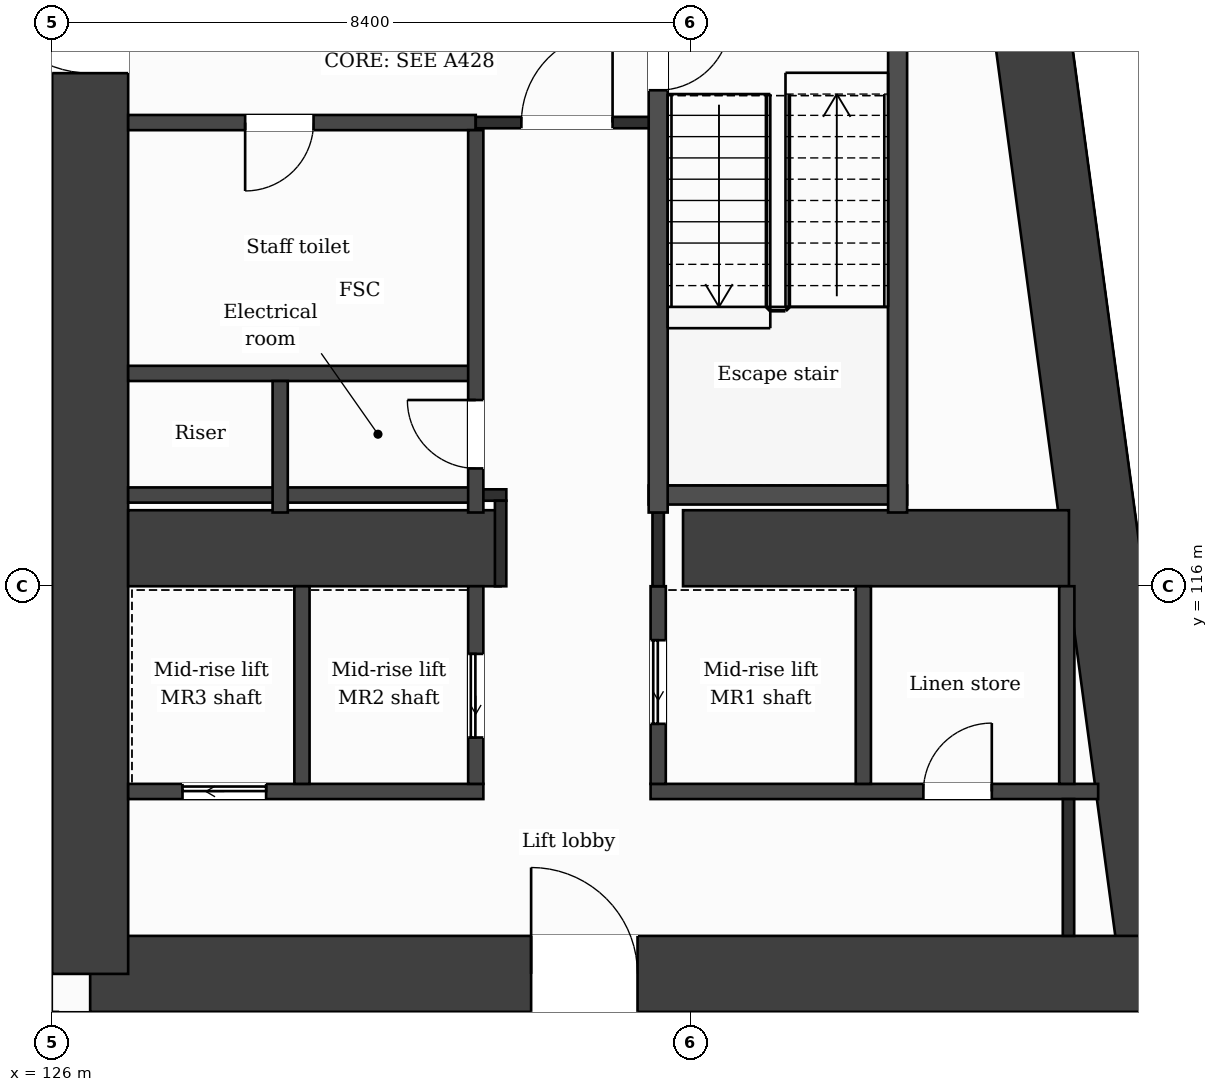
"""IFC4 building model, lengths in metres.
Left out: names, types, materials, properties, quantities, classifications, styles, units other than length and angle.
Written with IfcOpenShell. Run it as: python <this file> out.ifc"""

import sys

from ifc_helpers import new_model, si_unit, direction, frame, frame_2d, origin, place, context, subcontext, project, spatial, rectangle, extrude, element, fill, save


model = new_model("IFC4")
c1 = context("Model", 3, precision=1e-05, world=origin(), true_north=direction((0.0, 1.0)))
c2 = subcontext(c1, "Body", "Model", "MODEL_VIEW")
j1 = project(units=[si_unit("LENGTHUNIT", "METRE"), si_unit("PLANEANGLEUNIT", "RADIAN")], contexts=[c1])
p1 = place(None, origin())
s1 = spatial("IfcSite", under=j1, at=p1, CompositionType="ELEMENT")
p2 = place(p1, origin())
s2 = spatial("IfcBuilding", under=s1, at=p2, CompositionType="ELEMENT")
p3 = place(p2, frame((0.0, 0.0, 116.9)))
s3 = spatial("IfcBuildingStorey", under=s2, at=p3, CompositionType="ELEMENT", Elevation=116.9)
p4 = place(p3, frame((137.732, 131.9, 0.0), z_axis=(0.0, 0.0, 1.0), x_axis=(0.133411141623, -0.991060778808, 0.0)))
e1 = element("IfcWall", 1, at=p4, inside=s3, PredefinedType="SHEAR", context=c2, shape_type="SweptSolid", body=[
    extrude(rectangle(XDim=21.189, YDim=1.0, at=frame_2d((10.595, 0.0))), origin(), (0.0, 0.0, 1.0), 3.7),
])
p5 = place(p3, frame((140.559, 110.9, 0.0), z_axis=(0.0, 0.0, 1.0), x_axis=(-1.0, 0.0, 0.0)))
e2 = element("IfcWall", 2, at=p5, inside=s3, PredefinedType="SHEAR", context=c2, shape_type="SweptSolid", body=[
    extrude(rectangle(XDim=14.059, YDim=1.0, at=frame_2d((7.029, 0.0))), origin(), (0.0, 0.0, 1.0), 3.7),
])
p6 = place(p5, frame((6.858, 0.0, 0.0)))
e3 = element("IfcOpeningElement", 3, at=p6, cuts=e2, PredefinedType="OPENING", context=c2, shape_type="SweptSolid", body=[
    extrude(rectangle(XDim=1.4, YDim=2.1, at=frame_2d((0.7, 1.05))), frame((0.0, 0.51, 0.0), z_axis=(0.0, -1.0, 0.0), x_axis=(1.0, 0.0, 0.0)), (0.0, 0.0, 1.0), 1.02),
])
p7 = place(p3, frame((126.5, 110.9, 0.0), z_axis=(0.0, 0.0, 1.0), x_axis=(0.0, 1.0, 0.0)))
e4 = element("IfcWall", 4, at=p7, inside=s3, PredefinedType="SHEAR", context=c2, shape_type="SweptSolid", body=[
    extrude(rectangle(XDim=21.0, YDim=1.0, at=frame_2d((10.5, 0.0))), origin(), (0.0, 0.0, 1.0), 3.7),
])
p8 = place(p7, frame((11.85, 0.0, 0.0)))
e5 = element("IfcOpeningElement", 5, at=p8, cuts=e4, PredefinedType="OPENING", context=c2, shape_type="SweptSolid", body=[
    extrude(rectangle(XDim=1.4, YDim=2.1, at=frame_2d((0.7, 1.05))), frame((0.0, 0.51, 0.0), z_axis=(0.0, -1.0, 0.0), x_axis=(1.0, 0.0, 0.0)), (0.0, 0.0, 1.0), 1.02),
])
p9 = place(p3, frame((127.0, 116.5, 0.0), z_axis=(0.0, 0.0, 1.0), x_axis=(1.0, 0.0, 0.0)))
e6 = element("IfcWall", 6, at=p9, inside=s3, PredefinedType="SHEAR", context=c2, shape_type="SweptSolid", body=[
    extrude(rectangle(XDim=4.9, YDim=1.0, at=frame_2d((2.45, 0.0))), origin(), (0.0, 0.0, 1.0), 3.7),
])
p10 = place(p3, frame((134.3, 116.5, 0.0), z_axis=(0.0, 0.0, 1.0), x_axis=(1.0, 0.0, 0.0)))
e7 = element("IfcWall", 7, at=p10, inside=s3, PredefinedType="SHEAR", context=c2, shape_type="SweptSolid", body=[
    extrude(rectangle(XDim=5.077, YDim=1.0, at=frame_2d((2.539, 0.0))), origin(), (0.0, 0.0, 1.0), 3.7),
])
p11 = place(p3, frame((140.348, 103.85, 0.0), z_axis=(0.0, 0.0, 1.0), x_axis=(-0.133431549479, 0.991058031401, 0.0)))
e8 = element("IfcWall", 8, at=p11, inside=s3, PredefinedType="SOLIDWALL", context=c2, shape_type="SweptSolid", body=[
    extrude(rectangle(XDim=6.609, YDim=0.3, at=frame_2d((3.304, 0.0))), origin(), (0.0, 0.0, 1.0), 3.38),
])
p12 = place(p11, frame((0.737, 0.0, 0.9)))
e9 = element("IfcOpeningElement", 9, at=p12, cuts=e8, PredefinedType="OPENING", context=c2, shape_type="SweptSolid", body=[
    extrude(rectangle(XDim=1.2, YDim=2.1, at=frame_2d((0.6, 1.05))), frame((0.0, 0.16, 0.0), z_axis=(0.0, -1.0, 0.0), x_axis=(1.0, 0.0, 0.0)), (0.0, 0.0, 1.0), 0.32),
])
p13 = place(p11, frame((3.991, 0.0, 0.0)))
e10 = element("IfcOpeningElement", 10, at=p13, cuts=e8, PredefinedType="OPENING", context=c2, shape_type="SweptSolid", body=[
    extrude(rectangle(XDim=1.2, YDim=2.4, at=frame_2d((0.6, 1.2))), frame((0.0, 0.16, 0.0), z_axis=(0.0, -1.0, 0.0), x_axis=(1.0, 0.0, 0.0)), (0.0, 0.0, 1.0), 0.32),
])
p14 = place(p3, frame((127.0, 113.3, 0.0), z_axis=(0.0, 0.0, 1.0), x_axis=(1.0, 0.0, 0.0)))
e11 = element("IfcWall", 11, at=p14, inside=s3, PredefinedType="PARTITIONING", context=c2, shape_type="SweptSolid", body=[
    extrude(rectangle(XDim=4.673, YDim=0.2, at=frame_2d((2.336, 0.0))), origin(), (0.0, 0.0, 1.0), 3.38),
])
p15 = place(p14, frame((0.715, 0.0, 0.0)))
e12 = element("IfcOpeningElement", 12, at=p15, cuts=e11, PredefinedType="OPENING", context=c2, shape_type="SweptSolid", body=[
    extrude(rectangle(XDim=1.1, YDim=2.1, at=frame_2d((0.55, 1.05))), frame((0.0, 0.11, 0.0), z_axis=(0.0, -1.0, 0.0), x_axis=(1.0, 0.0, 0.0)), (0.0, 0.0, 1.0), 0.22),
])
p16 = place(p3, frame((133.873, 113.3, 0.0), z_axis=(0.0, 0.0, 1.0), x_axis=(1.0, 0.0, 0.0)))
e13 = element("IfcWall", 13, at=p16, inside=s3, PredefinedType="PARTITIONING", context=c2, shape_type="SweptSolid", body=[
    extrude(rectangle(XDim=5.888, YDim=0.2, at=frame_2d((2.944, 0.0))), origin(), (0.0, 0.0, 1.0), 3.38),
])
p17 = place(p16, frame((3.589, 0.0, 0.0)))
e14 = element("IfcOpeningElement", 14, at=p17, cuts=e13, PredefinedType="OPENING", context=c2, shape_type="SweptSolid", body=[
    extrude(rectangle(XDim=0.9, YDim=2.1, at=frame_2d((0.45, 1.05))), frame((0.0, 0.11, 0.0), z_axis=(0.0, -1.0, 0.0), x_axis=(1.0, 0.0, 0.0)), (0.0, 0.0, 1.0), 0.22),
])
p18 = place(p3, frame((127.0, 117.2, 0.0), z_axis=(0.0, 0.0, 1.0), x_axis=(1.0, 0.0, 0.0)))
e15 = element("IfcWall", 15, at=p18, inside=s3, PredefinedType="PARTITIONING", context=c2, shape_type="SweptSolid", body=[
    extrude(rectangle(XDim=4.573, YDim=0.2, at=frame_2d((2.287, 0.0))), origin(), (0.0, 0.0, 1.0), 3.38),
])
p19 = place(p3, frame((131.573, 117.2, 0.0), z_axis=(0.0, 0.0, 1.0), x_axis=(1.0, 0.0, 0.0)))
e16 = element("IfcWall", 16, at=p19, inside=s3, PredefinedType="PARTITIONING", context=c2, shape_type="SweptSolid", body=[
    extrude(rectangle(XDim=0.402, YDim=0.15, at=frame_2d((0.201, 0.0))), origin(), (0.0, 0.0, 1.0), 3.38),
])
p20 = place(p3, frame((133.848, 117.2, 0.0), z_axis=(0.0, 0.0, 1.0), x_axis=(1.0, 0.0, 0.0)))
e17 = element("IfcWall", 17, at=p20, inside=s3, PredefinedType="PARTITIONING", context=c2, shape_type="SweptSolid", body=[
    extrude(rectangle(XDim=3.4, YDim=0.25, at=frame_2d((1.7, 0.0))), origin(), (0.0, 0.0, 1.0), 3.38),
])
p21 = place(p3, frame((127.0, 118.8, 0.0), z_axis=(0.0, 0.0, 1.0), x_axis=(1.0, 0.0, 0.0)))
e18 = element("IfcWall", 18, at=p21, inside=s3, PredefinedType="PARTITIONING", context=c2, shape_type="SweptSolid", body=[
    extrude(rectangle(XDim=4.573, YDim=0.2, at=frame_2d((2.287, 0.0))), origin(), (0.0, 0.0, 1.0), 3.38),
])
p22 = place(p3, frame((127.0, 122.1, 0.0), z_axis=(0.0, 0.0, 1.0), x_axis=(1.0, 0.0, 0.0)))
e19 = element("IfcWall", 19, at=p22, inside=s3, PredefinedType="PARTITIONING", context=c2, shape_type="SweptSolid", body=[
    extrude(rectangle(XDim=4.573, YDim=0.2, at=frame_2d((2.287, 0.0))), origin(), (0.0, 0.0, 1.0), 3.38),
])
p23 = place(p22, frame((1.539, 0.0, 0.0)))
e20 = element("IfcOpeningElement", 20, at=p23, cuts=e19, PredefinedType="OPENING", context=c2, shape_type="SweptSolid", body=[
    extrude(rectangle(XDim=0.9, YDim=2.1, at=frame_2d((0.45, 1.05))), frame((0.0, 0.11, 0.0), z_axis=(0.0, -1.0, 0.0), x_axis=(1.0, 0.0, 0.0)), (0.0, 0.0, 1.0), 0.22),
])
p24 = place(p3, frame((131.573, 122.1, 0.0), z_axis=(0.0, 0.0, 1.0), x_axis=(1.0, 0.0, 0.0)))
e21 = element("IfcWall", 21, at=p24, inside=s3, PredefinedType="PARTITIONING", context=c2, shape_type="SweptSolid", body=[
    extrude(rectangle(XDim=2.4, YDim=0.15, at=frame_2d((1.2, 0.0))), origin(), (0.0, 0.0, 1.0), 3.38),
])
p25 = place(p24, frame((0.6, 0.0, 0.0)))
e22 = element("IfcOpeningElement", 22, at=p25, cuts=e21, PredefinedType="OPENING", context=c2, shape_type="SweptSolid", body=[
    extrude(rectangle(XDim=1.2, YDim=2.1, at=frame_2d((0.6, 1.05))), frame((0.0, 0.085, 0.0), z_axis=(0.0, -1.0, 0.0), x_axis=(1.0, 0.0, 0.0)), (0.0, 0.0, 1.0), 0.17),
])
p26 = place(p3, frame((100.8, 122.45, 0.0), z_axis=(0.0, 0.0, 1.0), x_axis=(1.0, 0.0, 0.0)))
e23 = element("IfcWall", 23, at=p26, inside=s3, PredefinedType="PARTITIONING", context=c2, shape_type="SweptSolid", body=[
    extrude(rectangle(XDim=25.2, YDim=0.15, at=frame_2d((12.6, 0.0))), origin(), (0.0, 0.0, 1.0), 3.38),
])
p27 = place(p3, frame((126.0, 109.075, 0.0), z_axis=(0.0, 0.0, 1.0), x_axis=(0.0, 1.0, 0.0)))
e24 = element("IfcWall", 24, at=p27, inside=s3, PredefinedType="PARTITIONING", context=c2, shape_type="SweptSolid", body=[
    extrude(rectangle(XDim=1.325, YDim=0.15, at=frame_2d((0.663, 0.0))), origin(), (0.0, 0.0, 1.0), 3.38),
])
p28 = place(p3, frame((129.0, 116.97, 0.0), z_axis=(0.0, 0.0, 1.0), x_axis=(0.0, 1.0, 0.0)))
e25 = element("IfcWall", 25, at=p28, inside=s3, PredefinedType="PARTITIONING", context=c2, shape_type="SweptSolid", body=[
    extrude(rectangle(XDim=1.73, YDim=0.2, at=frame_2d((0.865, 0.0))), origin(), (0.0, 0.0, 1.0), 3.38),
])
p29 = place(p3, frame((129.287, 113.4, 0.0), z_axis=(0.0, 0.0, 1.0), x_axis=(0.0, 1.0, 0.0)))
e26 = element("IfcWall", 26, at=p29, inside=s3, PredefinedType="PARTITIONING", context=c2, shape_type="SweptSolid", body=[
    extrude(rectangle(XDim=2.6, YDim=0.2, at=frame_2d((1.3, 0.0))), origin(), (0.0, 0.0, 1.0), 3.38),
])
p30 = place(p3, frame((131.573, 113.4, 0.0), z_axis=(0.0, 0.0, 1.0), x_axis=(0.0, 1.0, 0.0)))
e27 = element("IfcWall", 27, at=p30, inside=s3, PredefinedType="PARTITIONING", context=c2, shape_type="SweptSolid", body=[
    extrude(rectangle(XDim=2.6, YDim=0.2, at=frame_2d((1.3, 0.0))), origin(), (0.0, 0.0, 1.0), 3.38),
])
p31 = place(p30, frame((0.61, 0.0, 0.0)))
e28 = element("IfcOpeningElement", 28, at=p31, cuts=e27, PredefinedType="OPENING", context=c2, shape_type="SweptSolid", body=[
    extrude(rectangle(XDim=1.1, YDim=2.1, at=frame_2d((0.55, 1.05))), frame((0.0, 0.11, 0.0), z_axis=(0.0, -1.0, 0.0), x_axis=(1.0, 0.0, 0.0)), (0.0, 0.0, 1.0), 0.22),
])
p32 = place(p3, frame((131.573, 116.97, 0.0), z_axis=(0.0, 0.0, 1.0), x_axis=(0.0, 1.0, 0.0)))
e29 = element("IfcWall", 29, at=p32, inside=s3, PredefinedType="PARTITIONING", context=c2, shape_type="SweptSolid", body=[
    extrude(rectangle(XDim=5.03, YDim=0.2, at=frame_2d((2.515, 0.0))), origin(), (0.0, 0.0, 1.0), 3.38),
])
p33 = place(p32, frame((0.58, 0.0, 0.0)))
e30 = element("IfcOpeningElement", 30, at=p33, cuts=e29, PredefinedType="OPENING", context=c2, shape_type="SweptSolid", body=[
    extrude(rectangle(XDim=0.9, YDim=2.1, at=frame_2d((0.45, 1.05))), frame((0.0, 0.11, 0.0), z_axis=(0.0, -1.0, 0.0), x_axis=(1.0, 0.0, 0.0)), (0.0, 0.0, 1.0), 0.22),
])
p34 = place(p3, frame((131.9, 116.0, 0.0), z_axis=(0.0, 0.0, 1.0), x_axis=(0.0, 1.0, 0.0)))
e31 = element("IfcWall", 31, at=p34, inside=s3, PredefinedType="PARTITIONING", context=c2, shape_type="SweptSolid", body=[
    extrude(rectangle(XDim=1.125, YDim=0.15, at=frame_2d((0.562, 0.0))), origin(), (0.0, 0.0, 1.0), 3.38),
])
p35 = place(p3, frame((133.973, 113.4, 0.0), z_axis=(0.0, 0.0, 1.0), x_axis=(0.0, 1.0, 0.0)))
e32 = element("IfcWall", 32, at=p35, inside=s3, PredefinedType="PARTITIONING", context=c2, shape_type="SweptSolid", body=[
    extrude(rectangle(XDim=2.6, YDim=0.2, at=frame_2d((1.3, 0.0))), origin(), (0.0, 0.0, 1.0), 3.38),
])
p36 = place(p35, frame((0.79, 0.0, 0.0)))
e33 = element("IfcOpeningElement", 33, at=p36, cuts=e32, PredefinedType="OPENING", context=c2, shape_type="SweptSolid", body=[
    extrude(rectangle(XDim=1.1, YDim=2.1, at=frame_2d((0.55, 1.05))), frame((0.0, 0.11, 0.0), z_axis=(0.0, -1.0, 0.0), x_axis=(1.0, 0.0, 0.0)), (0.0, 0.0, 1.0), 0.22),
])
p37 = place(p3, frame((133.973, 116.0, 0.0), z_axis=(0.0, 0.0, 1.0), x_axis=(0.0, 1.0, 0.0)))
e34 = element("IfcWall", 34, at=p37, inside=s3, PredefinedType="PARTITIONING", context=c2, shape_type="SweptSolid", body=[
    extrude(rectangle(XDim=0.97, YDim=0.15, at=frame_2d((0.485, 0.0))), origin(), (0.0, 0.0, 1.0), 3.38),
])
p38 = place(p3, frame((133.973, 116.97, 0.0), z_axis=(0.0, 0.0, 1.0), x_axis=(0.0, 1.0, 0.0)))
e35 = element("IfcWall", 35, at=p38, inside=s3, PredefinedType="PARTITIONING", context=c2, shape_type="SweptSolid", body=[
    extrude(rectangle(XDim=6.855, YDim=0.25, at=frame_2d((3.427, 0.0))), origin(), (0.0, 0.0, 1.0), 3.38),
])
p39 = place(p38, frame((5.555, 0.0, 0.0)))
e36 = element("IfcOpeningElement", 36, at=p39, cuts=e35, PredefinedType="OPENING", context=c2, shape_type="SweptSolid", body=[
    extrude(rectangle(XDim=0.95, YDim=2.1, at=frame_2d((0.475, 1.05))), frame((0.0, 0.135, 0.0), z_axis=(0.0, -1.0, 0.0), x_axis=(1.0, 0.0, 0.0)), (0.0, 0.0, 1.0), 0.27),
])
p40 = place(p3, frame((136.672, 113.4, 0.0), z_axis=(0.0, 0.0, 1.0), x_axis=(0.0, 1.0, 0.0)))
e37 = element("IfcWall", 37, at=p40, inside=s3, PredefinedType="PARTITIONING", context=c2, shape_type="SweptSolid", body=[
    extrude(rectangle(XDim=2.6, YDim=0.2, at=frame_2d((1.3, 0.0))), origin(), (0.0, 0.0, 1.0), 3.38),
])
p41 = place(p3, frame((137.123, 116.97, 0.0), z_axis=(0.0, 0.0, 1.0), x_axis=(0.0, 1.0, 0.0)))
e38 = element("IfcWall", 38, at=p41, inside=s3, PredefinedType="PARTITIONING", context=c2, shape_type="SweptSolid", body=[
    extrude(rectangle(XDim=6.855, YDim=0.25, at=frame_2d((3.427, 0.0))), origin(), (0.0, 0.0, 1.0), 3.38),
])
p42 = place(p3, frame((139.349, 113.4, 0.0), z_axis=(0.0, 0.0, 1.0), x_axis=(0.0, 1.0, 0.0)))
e39 = element("IfcWall", 39, at=p42, inside=s3, PredefinedType="PARTITIONING", context=c2, shape_type="SweptSolid", body=[
    extrude(rectangle(XDim=2.6, YDim=0.2, at=frame_2d((1.3, 0.0))), origin(), (0.0, 0.0, 1.0), 3.38),
])
p43 = place(p3, frame((139.371, 111.4, 0.0), z_axis=(0.0, 0.0, 1.0), x_axis=(0.0, 1.0, 0.0)))
e40 = element("IfcWall", 40, at=p43, inside=s3, PredefinedType="PARTITIONING", context=c2, shape_type="SweptSolid", body=[
    extrude(rectangle(XDim=1.8, YDim=0.15, at=frame_2d((0.9, 0.0))), origin(), (0.0, 0.0, 1.0), 3.38),
])
p44 = place(p25, origin())
e41 = element("IfcDoor", 41, at=p44, inside=s3, OperationType="SINGLE_SWING_RIGHT", PredefinedType="DOOR", context=c2, shape_type="SweptSolid", body=[
    extrude(rectangle(XDim=1.2, YDim=2.1, at=frame_2d((0.6, 1.05))), frame((0.0, 0.025, 0.0), z_axis=(0.0, -1.0, 0.0), x_axis=(1.0, 0.0, 0.0)), (0.0, 0.0, 1.0), 0.05),
])
fill(e22, e41)
p45 = place(p23, origin())
e42 = element("IfcDoor", 42, at=p45, inside=s3, OperationType="SINGLE_SWING_LEFT", PredefinedType="DOOR", context=c2, shape_type="SweptSolid", body=[
    extrude(rectangle(XDim=0.9, YDim=2.1, at=frame_2d((0.45, 1.05))), frame((0.0, 0.025, 0.0), z_axis=(0.0, -1.0, 0.0), x_axis=(1.0, 0.0, 0.0)), (0.0, 0.0, 1.0), 0.05),
])
fill(e20, e42)
p46 = place(p39, origin())
e43 = element("IfcDoor", 43, at=p46, inside=s3, OperationType="SINGLE_SWING_RIGHT", PredefinedType="DOOR", context=c2, shape_type="SweptSolid", body=[
    extrude(rectangle(XDim=0.95, YDim=2.1, at=frame_2d((0.475, 1.05))), frame((0.0, 0.025, 0.0), z_axis=(0.0, -1.0, 0.0), x_axis=(1.0, 0.0, 0.0)), (0.0, 0.0, 1.0), 0.05),
])
fill(e36, e43)
p47 = place(p33, origin())
e44 = element("IfcDoor", 44, at=p47, inside=s3, OperationType="SINGLE_SWING_RIGHT", PredefinedType="DOOR", context=c2, shape_type="SweptSolid", body=[
    extrude(rectangle(XDim=0.9, YDim=2.1, at=frame_2d((0.45, 1.05))), frame((0.0, 0.025, 0.0), z_axis=(0.0, -1.0, 0.0), x_axis=(1.0, 0.0, 0.0)), (0.0, 0.0, 1.0), 0.05),
])
fill(e30, e44)
p48 = place(p36, origin())
e45 = element("IfcDoor", 45, at=p48, inside=s3, OperationType="SLIDING_TO_LEFT", PredefinedType="DOOR", context=c2, shape_type="SweptSolid", body=[
    extrude(rectangle(XDim=1.1, YDim=2.1, at=frame_2d((0.55, 1.05))), frame((0.0, 0.025, 0.0), z_axis=(0.0, -1.0, 0.0), x_axis=(1.0, 0.0, 0.0)), (0.0, 0.0, 1.0), 0.05),
])
fill(e33, e45)
p49 = place(p31, origin())
e46 = element("IfcDoor", 46, at=p49, inside=s3, OperationType="SLIDING_TO_LEFT", PredefinedType="DOOR", context=c2, shape_type="SweptSolid", body=[
    extrude(rectangle(XDim=1.1, YDim=2.1, at=frame_2d((0.55, 1.05))), frame((0.0, 0.025, 0.0), z_axis=(0.0, -1.0, 0.0), x_axis=(1.0, 0.0, 0.0)), (0.0, 0.0, 1.0), 0.05),
])
fill(e28, e46)
p50 = place(p15, origin())
e47 = element("IfcDoor", 47, at=p50, inside=s3, OperationType="SLIDING_TO_LEFT", PredefinedType="DOOR", context=c2, shape_type="SweptSolid", body=[
    extrude(rectangle(XDim=1.1, YDim=2.1, at=frame_2d((0.55, 1.05))), frame((0.0, 0.025, 0.0), z_axis=(0.0, -1.0, 0.0), x_axis=(1.0, 0.0, 0.0)), (0.0, 0.0, 1.0), 0.05),
])
fill(e12, e47)
p51 = place(p17, origin())
e48 = element("IfcDoor", 48, at=p51, inside=s3, OperationType="SINGLE_SWING_RIGHT", PredefinedType="DOOR", context=c2, shape_type="SweptSolid", body=[
    extrude(rectangle(XDim=0.9, YDim=2.1, at=frame_2d((0.45, 1.05))), frame((0.0, 0.025, 0.0), z_axis=(0.0, -1.0, 0.0), x_axis=(1.0, 0.0, 0.0)), (0.0, 0.0, 1.0), 0.05),
])
fill(e14, e48)
p52 = place(p6, origin())
e49 = element("IfcDoor", 49, at=p52, inside=s3, OperationType="SINGLE_SWING_RIGHT", PredefinedType="DOOR", context=c2, shape_type="SweptSolid", body=[
    extrude(rectangle(XDim=1.4, YDim=2.1, at=frame_2d((0.7, 1.05))), frame((0.0, 0.025, 0.0), z_axis=(0.0, -1.0, 0.0), x_axis=(1.0, 0.0, 0.0)), (0.0, 0.0, 1.0), 0.05),
])
fill(e3, e49)
p53 = place(p8, origin())
e50 = element("IfcDoor", 50, at=p53, inside=s3, OperationType="SINGLE_SWING_RIGHT", PredefinedType="DOOR", context=c2, shape_type="SweptSolid", body=[
    extrude(rectangle(XDim=1.4, YDim=2.1, at=frame_2d((0.7, 1.05))), frame((0.0, 0.025, 0.0), z_axis=(0.0, -1.0, 0.0), x_axis=(1.0, 0.0, 0.0)), (0.0, 0.0, 1.0), 0.05),
])
fill(e5, e50)
save(model, sys.argv[1])
